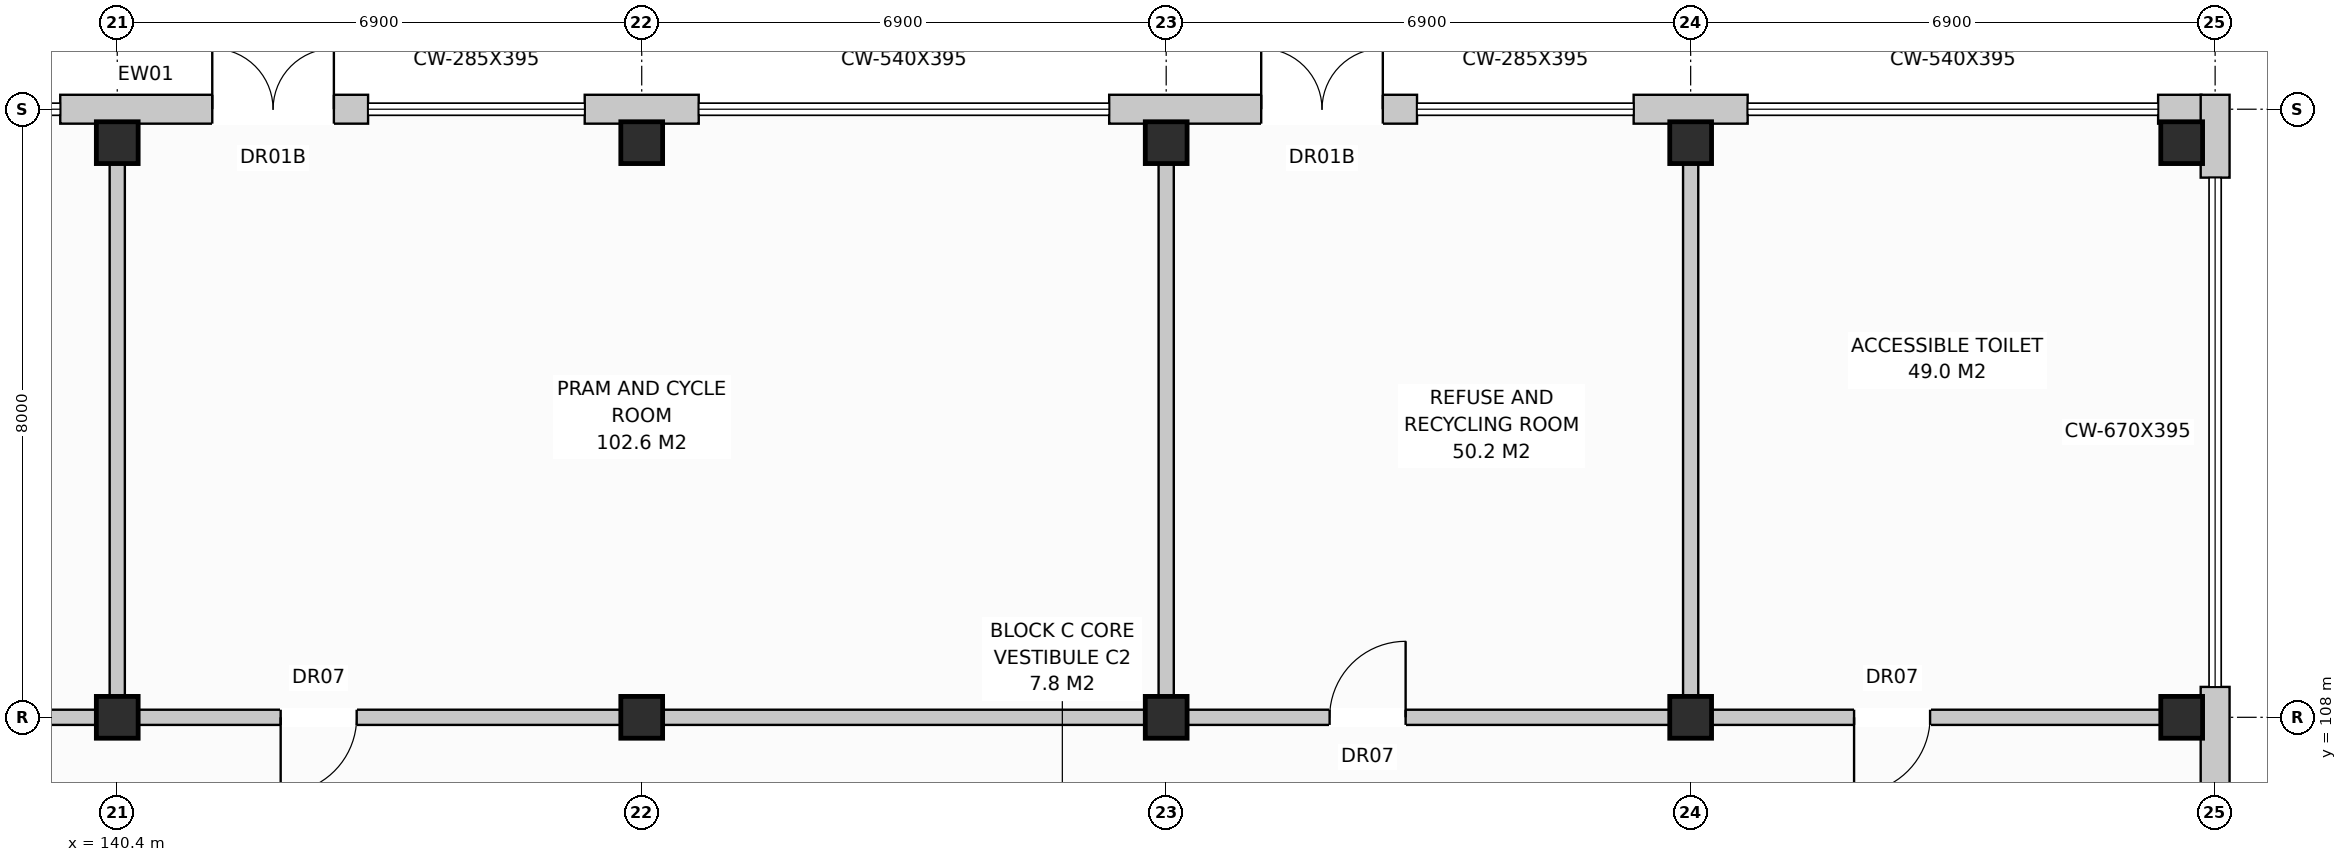
"""IFC4 building model, lengths in metres.
Left out: names, types, materials, properties, quantities, classifications, styles, units other than length and angle.
Written with IfcOpenShell. Run it as: python <this file> out.ifc"""

import sys

from ifc_helpers import new_model, si_unit, direction, frame, frame_2d, origin, origin_with_axes, origin_2d, place, context, subcontext, project, spatial, rectangle, extrude, element, fill, save


model = new_model("IFC4")
c1 = context("Model", 3, precision=1e-05, world=origin(), true_north=direction((0.0, 1.0)))
c2 = subcontext(c1, "Body", "Model", "MODEL_VIEW")
j1 = project(units=[si_unit("LENGTHUNIT", "METRE"), si_unit("PLANEANGLEUNIT", "RADIAN")], contexts=[c1])
p1 = place(None, origin())
s1 = spatial("IfcSite", under=j1, at=p1, CompositionType="ELEMENT")
p2 = place(p1, origin())
s2 = spatial("IfcBuilding", under=s1, at=p2, CompositionType="ELEMENT")
p3 = place(p2, origin())
s3 = spatial("IfcBuildingStorey", under=s2, at=p3, CompositionType="ELEMENT", Elevation=0.0)
for number, where, z_axis, x_axis in (
    (1, (140.4, 108.0, 0.0), (0.0, 0.0, 1.0), (1.0, 0.0, 0.0)),
    (2, (140.4, 115.56, 0.0), (0.0, 0.0, 1.0), (1.0, 0.0, 0.0)),
    (3, (147.3, 108.0, 0.0), (0.0, 0.0, 1.0), (1.0, 0.0, 0.0)),
    (4, (147.3, 115.56, 0.0), (0.0, 0.0, 1.0), (1.0, 0.0, 0.0)),
    (5, (154.2, 108.0, 0.0), (0.0, 0.0, 1.0), (1.0, 0.0, 0.0)),
    (6, (154.2, 115.56, 0.0), (0.0, 0.0, 1.0), (1.0, 0.0, 0.0)),
    (7, (161.1, 108.0, 0.0), (0.0, 0.0, 1.0), (1.0, 0.0, 0.0)),
    (8, (161.1, 115.56, 0.0), (0.0, 0.0, 1.0), (1.0, 0.0, 0.0)),
    (9, (167.56, 108.0, 0.0), (0.0, 0.0, 1.0), (1.0, 0.0, 0.0)),
    (10, (167.56, 115.56, 0.0), (0.0, 0.0, 1.0), (1.0, 0.0, 0.0)),
):
    element("IfcColumn", number, at=place(p3, frame(where, z_axis=z_axis, x_axis=x_axis)), inside=s3, PredefinedType="COLUMN", context=c2, shape_type="SweptSolid", body=[
        extrude(rectangle(XDim=0.55, YDim=0.55, at=origin_2d()), origin(), (0.0, 0.0, 1.0), 4.4),
    ])
p4 = place(p3, frame((139.65, 116.0, 0.0), z_axis=(0.0, 0.0, 1.0), x_axis=(1.0, 0.0, 0.0)))
e11 = element("IfcWall", 11, at=p4, inside=s3, PredefinedType="STANDARD", context=c2, shape_type="SweptSolid", body=[
    extrude(rectangle(XDim=4.05, YDim=0.38, at=frame_2d((2.025, 0.0))), origin(), (0.0, 0.0, 1.0), 4.12),
])
p5 = place(p4, frame((2.0, 0.0, 0.0)))
e12 = element("IfcOpeningElement", 12, at=p5, cuts=e11, PredefinedType="OPENING", context=c2, shape_type="SweptSolid", body=[
    extrude(rectangle(XDim=1.6, YDim=2.3, at=frame_2d((0.8, 1.15))), frame((0.0, 0.202, 0.0), z_axis=(0.0, -1.0, 0.0), x_axis=(1.0, 0.0, 0.0)), (0.0, 0.0, 1.0), 0.404),
])
p6 = place(p3, frame((146.55, 116.0, 0.0), z_axis=(0.0, 0.0, 1.0), x_axis=(1.0, 0.0, 0.0)))
e13 = element("IfcWall", 13, at=p6, inside=s3, PredefinedType="STANDARD", context=c2, shape_type="SweptSolid", body=[
    extrude(rectangle(XDim=1.5, YDim=0.38, at=frame_2d((0.75, 0.0))), origin(), (0.0, 0.0, 1.0), 4.12),
])
p7 = place(p3, frame((153.45, 116.0, 0.0), z_axis=(0.0, 0.0, 1.0), x_axis=(1.0, 0.0, 0.0)))
e14 = element("IfcWall", 14, at=p7, inside=s3, PredefinedType="STANDARD", context=c2, shape_type="SweptSolid", body=[
    extrude(rectangle(XDim=4.05, YDim=0.38, at=frame_2d((2.025, 0.0))), origin(), (0.0, 0.0, 1.0), 4.12),
])
p8 = place(p7, frame((2.0, 0.0, 0.0)))
e15 = element("IfcOpeningElement", 15, at=p8, cuts=e14, PredefinedType="OPENING", context=c2, shape_type="SweptSolid", body=[
    extrude(rectangle(XDim=1.6, YDim=2.3, at=frame_2d((0.8, 1.15))), frame((0.0, 0.202, 0.0), z_axis=(0.0, -1.0, 0.0), x_axis=(1.0, 0.0, 0.0)), (0.0, 0.0, 1.0), 0.404),
])
p9 = place(p3, frame((160.35, 116.0, 0.0), z_axis=(0.0, 0.0, 1.0), x_axis=(1.0, 0.0, 0.0)))
e16 = element("IfcWall", 16, at=p9, inside=s3, PredefinedType="STANDARD", context=c2, shape_type="SweptSolid", body=[
    extrude(rectangle(XDim=1.5, YDim=0.38, at=frame_2d((0.75, 0.0))), origin(), (0.0, 0.0, 1.0), 4.12),
])
p10 = place(p3, frame((167.25, 116.0, 0.0), z_axis=(0.0, 0.0, 1.0), x_axis=(1.0, 0.0, 0.0)))
e17 = element("IfcWall", 17, at=p10, inside=s3, PredefinedType="STANDARD", context=c2, shape_type="SweptSolid", body=[
    extrude(rectangle(XDim=0.57, YDim=0.38, at=frame_2d((0.285, 0.0))), origin(), (0.0, 0.0, 1.0), 4.12),
])
p11 = place(p3, frame((168.0, 105.2, 0.0), z_axis=(0.0, 0.0, 1.0), x_axis=(0.0, 1.0, 0.0)))
e18 = element("IfcWall", 18, at=p11, inside=s3, PredefinedType="STANDARD", context=c2, shape_type="SweptSolid", body=[
    extrude(rectangle(XDim=3.2, YDim=0.38, at=frame_2d((1.6, 0.0))), origin(), (0.0, 0.0, 1.0), 4.12),
])
p12 = place(p3, frame((168.0, 115.1, 0.0), z_axis=(0.0, 0.0, 1.0), x_axis=(0.0, 1.0, 0.0)))
e19 = element("IfcWall", 19, at=p12, inside=s3, PredefinedType="STANDARD", context=c2, shape_type="SweptSolid", body=[
    extrude(rectangle(XDim=1.09, YDim=0.38, at=frame_2d((0.545, 0.0))), origin(), (0.0, 0.0, 1.0), 4.12),
])
p13 = place(p3, frame((126.75, 108.0, 0.0), z_axis=(0.0, 0.0, 1.0), x_axis=(1.0, 0.0, 0.0)))
e20 = element("IfcWall", 20, at=p13, inside=s3, PredefinedType="PARTITIONING", context=c2, shape_type="SweptSolid", body=[
    extrude(rectangle(XDim=13.5, YDim=0.2, at=frame_2d((6.75, 0.0))), origin(), (0.0, 0.0, 1.0), 3.56),
])
p14 = place(p13, frame((2.0, 0.0, 0.0)))
e21 = element("IfcOpeningElement", 21, at=p14, cuts=e20, PredefinedType="OPENING", context=c2, shape_type="SweptSolid", body=[
    extrude(rectangle(XDim=1.0, YDim=2.15, at=frame_2d((0.5, 1.075))), frame((0.0, 0.112, 0.0), z_axis=(0.0, -1.0, 0.0), x_axis=(1.0, 0.0, 0.0)), (0.0, 0.0, 1.0), 0.224),
])
p15 = place(p3, frame((140.4, 108.15, 0.0), z_axis=(0.0, 0.0, 1.0), x_axis=(0.0, 1.0, 0.0)))
e22 = element("IfcWall", 22, at=p15, inside=s3, PredefinedType="PARTITIONING", context=c2, shape_type="SweptSolid", body=[
    extrude(rectangle(XDim=7.6, YDim=0.2, at=frame_2d((3.8, 0.0))), origin(), (0.0, 0.0, 1.0), 4.12),
])
p16 = place(p3, frame((140.55, 108.0, 0.0), z_axis=(0.0, 0.0, 1.0), x_axis=(1.0, 0.0, 0.0)))
e23 = element("IfcWall", 23, at=p16, inside=s3, PredefinedType="PARTITIONING", context=c2, shape_type="SweptSolid", body=[
    extrude(rectangle(XDim=13.5, YDim=0.2, at=frame_2d((6.75, 0.0))), origin(), (0.0, 0.0, 1.0), 3.56),
])
p17 = place(p16, frame((2.0, 0.0, 0.0)))
e24 = element("IfcOpeningElement", 24, at=p17, cuts=e23, PredefinedType="OPENING", context=c2, shape_type="SweptSolid", body=[
    extrude(rectangle(XDim=1.0, YDim=2.15, at=frame_2d((0.5, 1.075))), frame((0.0, 0.112, 0.0), z_axis=(0.0, -1.0, 0.0), x_axis=(1.0, 0.0, 0.0)), (0.0, 0.0, 1.0), 0.224),
])
p18 = place(p3, frame((154.2, 108.15, 0.0), z_axis=(0.0, 0.0, 1.0), x_axis=(0.0, 1.0, 0.0)))
e25 = element("IfcWall", 25, at=p18, inside=s3, PredefinedType="PARTITIONING", context=c2, shape_type="SweptSolid", body=[
    extrude(rectangle(XDim=7.6, YDim=0.2, at=frame_2d((3.8, 0.0))), origin(), (0.0, 0.0, 1.0), 4.12),
])
p19 = place(p3, frame((154.35, 108.0, 0.0), z_axis=(0.0, 0.0, 1.0), x_axis=(1.0, 0.0, 0.0)))
e26 = element("IfcWall", 26, at=p19, inside=s3, PredefinedType="PARTITIONING", context=c2, shape_type="SweptSolid", body=[
    extrude(rectangle(XDim=6.6, YDim=0.2, at=frame_2d((3.3, 0.0))), origin(), (0.0, 0.0, 1.0), 3.56),
])
p20 = place(p19, frame((2.0, 0.0, 0.0)))
e27 = element("IfcOpeningElement", 27, at=p20, cuts=e26, PredefinedType="OPENING", context=c2, shape_type="SweptSolid", body=[
    extrude(rectangle(XDim=1.0, YDim=2.15, at=frame_2d((0.5, 1.075))), frame((0.0, 0.112, 0.0), z_axis=(0.0, -1.0, 0.0), x_axis=(1.0, 0.0, 0.0)), (0.0, 0.0, 1.0), 0.224),
])
p21 = place(p3, frame((161.1, 108.15, 0.0), z_axis=(0.0, 0.0, 1.0), x_axis=(0.0, 1.0, 0.0)))
e28 = element("IfcWall", 28, at=p21, inside=s3, PredefinedType="PARTITIONING", context=c2, shape_type="SweptSolid", body=[
    extrude(rectangle(XDim=7.6, YDim=0.2, at=frame_2d((3.8, 0.0))), origin(), (0.0, 0.0, 1.0), 3.56),
])
p22 = place(p3, frame((161.25, 108.0, 0.0), z_axis=(0.0, 0.0, 1.0), x_axis=(1.0, 0.0, 0.0)))
e29 = element("IfcWall", 29, at=p22, inside=s3, PredefinedType="PARTITIONING", context=c2, shape_type="SweptSolid", body=[
    extrude(rectangle(XDim=6.45, YDim=0.2, at=frame_2d((3.225, 0.0))), origin(), (0.0, 0.0, 1.0), 3.56),
])
p23 = place(p22, frame((2.0, 0.0, 0.0)))
e30 = element("IfcOpeningElement", 30, at=p23, cuts=e29, PredefinedType="OPENING", context=c2, shape_type="SweptSolid", body=[
    extrude(rectangle(XDim=1.0, YDim=2.15, at=frame_2d((0.5, 1.075))), frame((0.0, 0.112, 0.0), z_axis=(0.0, -1.0, 0.0), x_axis=(1.0, 0.0, 0.0)), (0.0, 0.0, 1.0), 0.224),
])
p24 = place(p5, origin_with_axes())
e31 = element("IfcDoor", 31, at=p24, inside=s3, OperationType="DOUBLE_DOOR_SINGLE_SWING", PredefinedType="DOOR", context=c2, shape_type="SweptSolid", body=[
    extrude(rectangle(XDim=1.6, YDim=2.3, at=frame_2d((0.8, 1.15))), frame((0.0, 0.025, 0.0), z_axis=(0.0, -1.0, 0.0), x_axis=(1.0, 0.0, 0.0)), (0.0, 0.0, 1.0), 0.05),
])
fill(e12, e31)
p25 = place(p8, origin_with_axes())
e32 = element("IfcDoor", 32, at=p25, inside=s3, OperationType="DOUBLE_DOOR_SINGLE_SWING", PredefinedType="DOOR", context=c2, shape_type="SweptSolid", body=[
    extrude(rectangle(XDim=1.6, YDim=2.3, at=frame_2d((0.8, 1.15))), frame((0.0, 0.025, 0.0), z_axis=(0.0, -1.0, 0.0), x_axis=(1.0, 0.0, 0.0)), (0.0, 0.0, 1.0), 0.05),
])
fill(e15, e32)
p26 = place(p17, frame((1.0, 0.0, 0.0), z_axis=(0.0, 0.0, 1.0), x_axis=(-1.0, 0.0, 0.0)))
e33 = element("IfcDoor", 33, at=p26, inside=s3, OperationType="SINGLE_SWING_LEFT", PredefinedType="DOOR", context=c2, shape_type="SweptSolid", body=[
    extrude(rectangle(XDim=1.0, YDim=2.15, at=frame_2d((0.5, 1.075))), frame((0.0, 0.025, 0.0), z_axis=(0.0, -1.0, 0.0), x_axis=(1.0, 0.0, 0.0)), (0.0, 0.0, 1.0), 0.05),
])
fill(e24, e33)
p27 = place(p20, origin_with_axes())
e34 = element("IfcDoor", 34, at=p27, inside=s3, OperationType="SINGLE_SWING_RIGHT", PredefinedType="DOOR", context=c2, shape_type="SweptSolid", body=[
    extrude(rectangle(XDim=1.0, YDim=2.15, at=frame_2d((0.5, 1.075))), frame((0.0, 0.025, 0.0), z_axis=(0.0, -1.0, 0.0), x_axis=(1.0, 0.0, 0.0)), (0.0, 0.0, 1.0), 0.05),
])
fill(e27, e34)
p28 = place(p23, frame((1.0, 0.0, 0.0), z_axis=(0.0, 0.0, 1.0), x_axis=(-1.0, 0.0, 0.0)))
e35 = element("IfcDoor", 35, at=p28, inside=s3, OperationType="SINGLE_SWING_LEFT", PredefinedType="DOOR", context=c2, shape_type="SweptSolid", body=[
    extrude(rectangle(XDim=1.0, YDim=2.15, at=frame_2d((0.5, 1.075))), frame((0.0, 0.025, 0.0), z_axis=(0.0, -1.0, 0.0), x_axis=(1.0, 0.0, 0.0)), (0.0, 0.0, 1.0), 0.05),
])
fill(e30, e35)
save(model, sys.argv[1])
